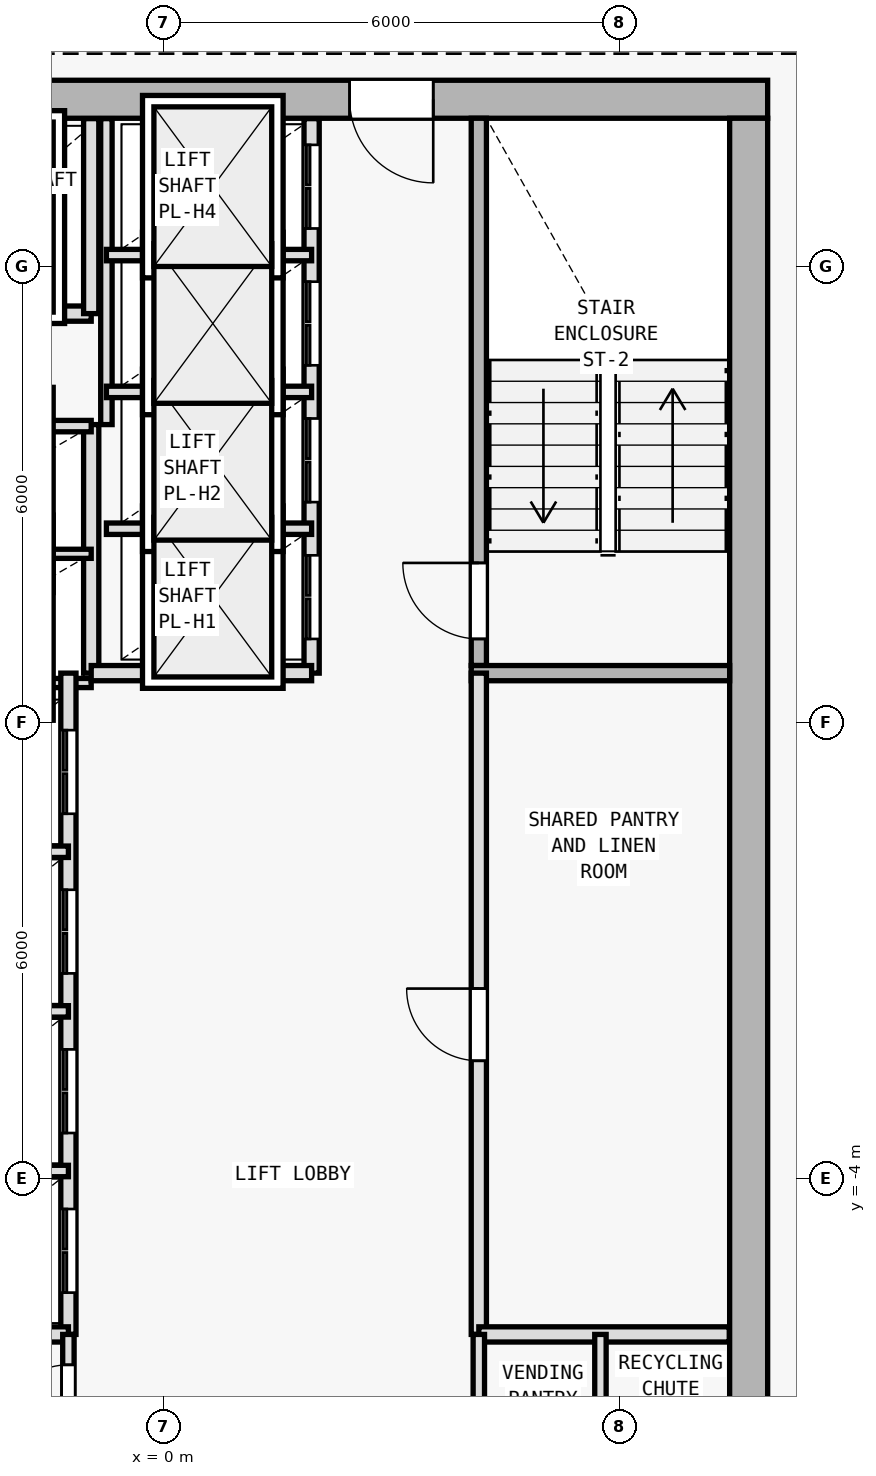
"""IFC4 building model, lengths in metres.
Left out: names, types, materials, properties, quantities, classifications, styles, units other than length and angle.
Written with IfcOpenShell. Run it as: python <this file> out.ifc"""

import sys

from ifc_helpers import new_model, si_unit, direction, frame, frame_2d, origin, origin_2d, place, context, subcontext, project, spatial, rectangle, i_section, extrude, element, fill, save


model = new_model("IFC4")
c1 = context("Model", 3, precision=1e-05, world=origin(), true_north=direction((0.0, 1.0)))
c2 = subcontext(c1, "Body", "Model", "MODEL_VIEW")
j1 = project(units=[si_unit("LENGTHUNIT", "METRE"), si_unit("PLANEANGLEUNIT", "RADIAN")], contexts=[c1])
p1 = place(None, origin())
s1 = spatial("IfcSite", under=j1, at=p1, CompositionType="ELEMENT")
p2 = place(p1, origin())
s2 = spatial("IfcBuilding", under=s1, at=p2, CompositionType="ELEMENT")
p3 = place(p2, frame((0.0, 0.0, 212.7)))
s3 = spatial("IfcBuildingStorey", under=s2, at=p3, CompositionType="ELEMENT", Elevation=212.7)
for number, where, z_axis, x_axis in (
    (1, (7.7, 10.2, 0.0), (0.0, 0.0, 1.0), (1.0, 0.0, 0.0)),
    (2, (7.7, 0.4, 0.0), (0.0, 0.0, 1.0), (1.0, 0.0, 0.0)),
):
    element("IfcColumn", number, at=place(p3, frame(where, z_axis=z_axis, x_axis=x_axis)), inside=s3, PredefinedType="COLUMN", context=c2, shape_type="SweptSolid", body=[
        extrude(i_section(OverallWidth=0.398, OverallDepth=0.387, WebThickness=0.013, FlangeThickness=0.022, FilletRadius=0.015, at=origin_2d()), origin(), (0.0, 0.0, 1.0), 3.6),
    ])
p4 = place(p3, frame((7.95, 10.2, 0.0), z_axis=(0.0, 0.0, 1.0), x_axis=(-1.0, 0.0, 0.0)))
e3 = element("IfcWall", 3, at=p4, inside=s3, PredefinedType="SHEAR", context=c2, shape_type="SweptSolid", body=[
    extrude(rectangle(XDim=15.9, YDim=0.5, at=frame_2d((7.95, 0.0))), origin(), (0.0, 0.0, 1.0), 3.35),
])
p5 = place(p4, frame((4.4, 0.0, 0.0)))
e4 = element("IfcOpeningElement", 4, at=p5, cuts=e3, PredefinedType="OPENING", context=c2, shape_type="SweptSolid", body=[
    extrude(rectangle(XDim=1.1, YDim=2.15, at=frame_2d((0.55, 1.075))), frame((0.0, 0.26, 0.0), z_axis=(0.0, -1.0, 0.0), x_axis=(1.0, 0.0, 0.0)), (0.0, 0.0, 1.0), 0.52),
])
p6 = place(p3, frame((7.7, 9.95, 0.0), z_axis=(0.0, 0.0, 1.0), x_axis=(0.0, -1.0, 0.0)))
e5 = element("IfcWall", 5, at=p6, inside=s3, PredefinedType="SHEAR", context=c2, shape_type="SweptSolid", body=[
    extrude(rectangle(XDim=19.1, YDim=0.5, at=frame_2d((9.55, 0.0))), origin(), (0.0, 0.0, 1.0), 3.35),
])
p7 = place(p3, frame((4.15, 2.75, 0.0), z_axis=(0.0, 0.0, 1.0), x_axis=(0.0, 1.0, 0.0)))
e6 = element("IfcWall", 6, at=p7, inside=s3, PredefinedType="SOLIDWALL", context=c2, shape_type="SweptSolid", body=[
    extrude(rectangle(XDim=7.2, YDim=0.2, at=frame_2d((3.6, 0.0))), origin(), (0.0, 0.0, 1.0), 3.35),
])
p8 = place(p7, frame((0.35, 0.0, 0.0)))
e7 = element("IfcOpeningElement", 7, at=p8, cuts=e6, PredefinedType="OPENING", context=c2, shape_type="SweptSolid", body=[
    extrude(rectangle(XDim=1.0, YDim=2.15, at=frame_2d((0.5, 1.075))), frame((0.0, 0.11, 0.0), z_axis=(0.0, -1.0, 0.0), x_axis=(1.0, 0.0, 0.0)), (0.0, 0.0, 1.0), 0.22),
])
p9 = place(p3, frame((4.05, 2.65, 0.0), z_axis=(0.0, 0.0, 1.0), x_axis=(1.0, 0.0, 0.0)))
e8 = element("IfcWall", 8, at=p9, inside=s3, PredefinedType="SOLIDWALL", context=c2, shape_type="SweptSolid", body=[
    extrude(rectangle(XDim=3.4, YDim=0.2, at=frame_2d((1.7, 0.0))), origin(), (0.0, 0.0, 1.0), 3.35),
])
p10 = place(p3, frame((-0.95, 2.65, 0.0), z_axis=(0.0, 0.0, 1.0), x_axis=(0.0, 1.0, 0.0)))
e9 = element("IfcWall", 9, at=p10, inside=s3, PredefinedType="SOLIDWALL", context=c2, shape_type="SweptSolid", body=[
    extrude(rectangle(XDim=3.27, YDim=0.2, at=frame_2d((1.635, 0.0))), origin(), (0.0, 0.0, 1.0), 3.35),
])
for number, where, z_axis, x_axis in (
    (10, (-3.85, 2.52, 0.0), (0.0, 0.0, 1.0), (1.0, 0.0, 0.0)),
    (11, (-3.85, 4.22, 0.0), (0.0, 0.0, 1.0), (1.0, 0.0, 0.0)),
):
    element("IfcWall", number, at=place(p3, frame(where, z_axis=z_axis, x_axis=x_axis)), inside=s3, PredefinedType="PARTITIONING", context=c2, shape_type="SweptSolid", body=[
        extrude(rectangle(XDim=2.9, YDim=0.12, at=frame_2d((1.45, 0.0))), origin(), (0.0, 0.0, 1.0), 3.35),
    ])
p11 = place(p3, frame((-3.85, 5.9, 0.0), z_axis=(0.0, 0.0, 1.0), x_axis=(1.0, 0.0, 0.0)))
e12 = element("IfcWall", 12, at=p11, inside=s3, PredefinedType="PARTITIONING", context=c2, shape_type="SweptSolid", body=[
    extrude(rectangle(XDim=2.9, YDim=0.15, at=frame_2d((1.45, 0.0))), origin(), (0.0, 0.0, 1.0), 3.35),
])
p12 = place(p3, frame((-3.85, 7.38, 0.0), z_axis=(0.0, 0.0, 1.0), x_axis=(1.0, 0.0, 0.0)))
e13 = element("IfcWall", 13, at=p12, inside=s3, PredefinedType="SOLIDWALL", context=c2, shape_type="SweptSolid", body=[
    extrude(rectangle(XDim=2.9, YDim=0.2, at=frame_2d((1.45, 0.0))), origin(), (0.0, 0.0, 1.0), 3.35),
])
p13 = place(p12, frame((0.85, 0.0, 0.0)))
e14 = element("IfcOpeningElement", 14, at=p13, cuts=e13, PredefinedType="OPENING", context=c2, shape_type="SweptSolid", body=[
    extrude(rectangle(XDim=1.2, YDim=2.2, at=frame_2d((0.6, 1.1))), frame((0.0, 0.11, 0.0), z_axis=(0.0, -1.0, 0.0), x_axis=(1.0, 0.0, 0.0)), (0.0, 0.0, 1.0), 0.22),
])
p14 = place(p3, frame((-0.95, 7.38, 0.0), z_axis=(0.0, 0.0, 1.0), x_axis=(0.0, 1.0, 0.0)))
e15 = element("IfcWall", 15, at=p14, inside=s3, PredefinedType="SOLIDWALL", context=c2, shape_type="SweptSolid", body=[
    extrude(rectangle(XDim=2.565, YDim=0.2, at=frame_2d((1.283, 0.0))), origin(), (0.0, 0.0, 1.0), 3.35),
])
p15 = place(p3, frame((4.15, -6.05, 0.0), z_axis=(0.0, 0.0, 1.0), x_axis=(0.0, 1.0, 0.0)))
e16 = element("IfcWall", 16, at=p15, inside=s3, PredefinedType="SOLIDWALL", context=c2, shape_type="SweptSolid", body=[
    extrude(rectangle(XDim=8.7, YDim=0.2, at=frame_2d((4.35, 0.0))), origin(), (0.0, 0.0, 1.0), 3.35),
])
p16 = place(p15, frame((3.6, 0.0, 0.0)))
e17 = element("IfcOpeningElement", 17, at=p16, cuts=e16, PredefinedType="OPENING", context=c2, shape_type="SweptSolid", body=[
    extrude(rectangle(XDim=0.95, YDim=2.1, at=frame_2d((0.475, 1.05))), frame((0.0, 0.11, 0.0), z_axis=(0.0, -1.0, 0.0), x_axis=(1.0, 0.0, 0.0)), (0.0, 0.0, 1.0), 0.22),
])
p17 = place(p3, frame((-1.25, -6.05, 0.0), z_axis=(0.0, 0.0, 1.0), x_axis=(0.0, 1.0, 0.0)))
e18 = element("IfcWall", 18, at=p17, inside=s3, PredefinedType="SOLIDWALL", context=c2, shape_type="SweptSolid", body=[
    extrude(rectangle(XDim=8.7, YDim=0.2, at=frame_2d((4.35, 0.0))), origin(), (0.0, 0.0, 1.0), 3.35),
])
p18 = place(p17, frame((0.55, 0.0, 0.0)))
e19 = element("IfcOpeningElement", 19, at=p18, cuts=e18, PredefinedType="OPENING", context=c2, shape_type="SweptSolid", body=[
    extrude(rectangle(XDim=1.1, YDim=2.15, at=frame_2d((0.55, 1.075))), frame((0.0, 0.11, 0.0), z_axis=(0.0, -1.0, 0.0), x_axis=(1.0, 0.0, 0.0)), (0.0, 0.0, 1.0), 0.22),
])
p19 = place(p17, frame((2.65, 0.0, 0.0)))
e20 = element("IfcOpeningElement", 20, at=p19, cuts=e18, PredefinedType="OPENING", context=c2, shape_type="SweptSolid", body=[
    extrude(rectangle(XDim=1.1, YDim=2.15, at=frame_2d((0.55, 1.075))), frame((0.0, 0.11, 0.0), z_axis=(0.0, -1.0, 0.0), x_axis=(1.0, 0.0, 0.0)), (0.0, 0.0, 1.0), 0.22),
])
p20 = place(p17, frame((4.75, 0.0, 0.0)))
e21 = element("IfcOpeningElement", 21, at=p20, cuts=e18, PredefinedType="OPENING", context=c2, shape_type="SweptSolid", body=[
    extrude(rectangle(XDim=1.1, YDim=2.15, at=frame_2d((0.55, 1.075))), frame((0.0, 0.11, 0.0), z_axis=(0.0, -1.0, 0.0), x_axis=(1.0, 0.0, 0.0)), (0.0, 0.0, 1.0), 0.22),
])
p21 = place(p17, frame((6.85, 0.0, 0.0)))
e22 = element("IfcOpeningElement", 22, at=p21, cuts=e18, PredefinedType="OPENING", context=c2, shape_type="SweptSolid", body=[
    extrude(rectangle(XDim=1.1, YDim=2.15, at=frame_2d((0.55, 1.075))), frame((0.0, 0.11, 0.0), z_axis=(0.0, -1.0, 0.0), x_axis=(1.0, 0.0, 0.0)), (0.0, 0.0, 1.0), 0.22),
])
for number, where, z_axis, x_axis in (
    (23, (-4.15, -3.9, 0.0), (0.0, 0.0, 1.0), (1.0, 0.0, 0.0)),
    (24, (-4.15, -1.8, 0.0), (0.0, 0.0, 1.0), (1.0, 0.0, 0.0)),
    (25, (-4.15, 0.3, 0.0), (0.0, 0.0, 1.0), (1.0, 0.0, 0.0)),
):
    element("IfcWall", number, at=place(p3, frame(where, z_axis=z_axis, x_axis=x_axis)), inside=s3, PredefinedType="PARTITIONING", context=c2, shape_type="SweptSolid", body=[
        extrude(rectangle(XDim=2.9, YDim=0.15, at=frame_2d((1.45, 0.0))), origin(), (0.0, 0.0, 1.0), 3.35),
    ])
p22 = place(p3, frame((1.95, 2.65, 0.0), z_axis=(0.0, 0.0, 1.0), x_axis=(0.0, 1.0, 0.0)))
e26 = element("IfcWall", 26, at=p22, inside=s3, PredefinedType="SOLIDWALL", context=c2, shape_type="SweptSolid", body=[
    extrude(rectangle(XDim=7.295, YDim=0.2, at=frame_2d((3.647, 0.0))), origin(), (0.0, 0.0, 1.0), 3.35),
])
p23 = place(p22, frame((0.45, 0.0, 0.0)))
e27 = element("IfcOpeningElement", 27, at=p23, cuts=e26, PredefinedType="OPENING", context=c2, shape_type="SweptSolid", body=[
    extrude(rectangle(XDim=1.1, YDim=2.15, at=frame_2d((0.55, 1.075))), frame((0.0, 0.11, 0.0), z_axis=(0.0, -1.0, 0.0), x_axis=(1.0, 0.0, 0.0)), (0.0, 0.0, 1.0), 0.22),
])
p24 = place(p22, frame((2.25, 0.0, 0.0)))
e28 = element("IfcOpeningElement", 28, at=p24, cuts=e26, PredefinedType="OPENING", context=c2, shape_type="SweptSolid", body=[
    extrude(rectangle(XDim=1.1, YDim=2.15, at=frame_2d((0.55, 1.075))), frame((0.0, 0.11, 0.0), z_axis=(0.0, -1.0, 0.0), x_axis=(1.0, 0.0, 0.0)), (0.0, 0.0, 1.0), 0.22),
])
p25 = place(p22, frame((4.05, 0.0, 0.0)))
e29 = element("IfcOpeningElement", 29, at=p25, cuts=e26, PredefinedType="OPENING", context=c2, shape_type="SweptSolid", body=[
    extrude(rectangle(XDim=1.1, YDim=2.15, at=frame_2d((0.55, 1.075))), frame((0.0, 0.11, 0.0), z_axis=(0.0, -1.0, 0.0), x_axis=(1.0, 0.0, 0.0)), (0.0, 0.0, 1.0), 0.22),
])
p26 = place(p22, frame((5.85, 0.0, 0.0)))
e30 = element("IfcOpeningElement", 30, at=p26, cuts=e26, PredefinedType="OPENING", context=c2, shape_type="SweptSolid", body=[
    extrude(rectangle(XDim=1.1, YDim=2.15, at=frame_2d((0.55, 1.075))), frame((0.0, 0.11, 0.0), z_axis=(0.0, -1.0, 0.0), x_axis=(1.0, 0.0, 0.0)), (0.0, 0.0, 1.0), 0.22),
])
p27 = place(p3, frame((-0.95, 2.65, 0.0), z_axis=(0.0, 0.0, 1.0), x_axis=(1.0, 0.0, 0.0)))
e31 = element("IfcWall", 31, at=p27, inside=s3, PredefinedType="SOLIDWALL", context=c2, shape_type="SweptSolid", body=[
    extrude(rectangle(XDim=2.9, YDim=0.2, at=frame_2d((1.45, 0.0))), origin(), (0.0, 0.0, 1.0), 3.35),
])
p28 = place(p3, frame((-0.75, 5.92, 0.0), z_axis=(0.0, 0.0, 1.0), x_axis=(0.0, 1.0, 0.0)))
e32 = element("IfcWall", 32, at=p28, inside=s3, PredefinedType="PARTITIONING", context=c2, shape_type="SweptSolid", body=[
    extrude(rectangle(XDim=4.025, YDim=0.15, at=frame_2d((2.013, 0.0))), origin(), (0.0, 0.0, 1.0), 3.35),
])
for number, where, z_axis, x_axis in (
    (33, (-0.75, 4.55, 0.0), (0.0, 0.0, 1.0), (1.0, 0.0, 0.0)),
    (34, (-0.75, 6.35, 0.0), (0.0, 0.0, 1.0), (1.0, 0.0, 0.0)),
    (35, (-0.75, 8.15, 0.0), (0.0, 0.0, 1.0), (1.0, 0.0, 0.0)),
):
    element("IfcWall", number, at=place(p3, frame(where, z_axis=z_axis, x_axis=x_axis)), inside=s3, PredefinedType="PARTITIONING", context=c2, shape_type="SweptSolid", body=[
        extrude(rectangle(XDim=2.7, YDim=0.15, at=frame_2d((1.35, 0.0))), origin(), (0.0, 0.0, 1.0), 3.35),
    ])
p29 = place(p3, frame((-4.04, -6.05, 0.0), z_axis=(0.0, 0.0, 1.0), x_axis=(1.0, 0.0, 0.0)))
e36 = element("IfcWall", 36, at=p29, inside=s3, PredefinedType="SOLIDWALL", context=c2, shape_type="SweptSolid", body=[
    extrude(rectangle(XDim=2.79, YDim=0.2, at=frame_2d((1.395, 0.0))), origin(), (0.0, 0.0, 1.0), 3.35),
])
p30 = place(p3, frame((4.15, -6.05, 0.0), z_axis=(0.0, 0.0, 1.0), x_axis=(1.0, 0.0, 0.0)))
e37 = element("IfcWall", 37, at=p30, inside=s3, PredefinedType="SOLIDWALL", context=c2, shape_type="SweptSolid", body=[
    extrude(rectangle(XDim=3.295, YDim=0.2, at=frame_2d((1.647, 0.0))), origin(), (0.0, 0.0, 1.0), 3.35),
])
p31 = place(p3, frame((-1.25, -9.145, 0.0), z_axis=(0.0, 0.0, 1.0), x_axis=(0.0, 1.0, 0.0)))
e38 = element("IfcWall", 38, at=p31, inside=s3, PredefinedType="PARTITIONING", context=c2, shape_type="SweptSolid", body=[
    extrude(rectangle(XDim=3.095, YDim=0.15, at=frame_2d((1.547, 0.0))), origin(), (0.0, 0.0, 1.0), 3.35),
])
p32 = place(p31, frame((1.795, 0.0, 0.0)))
e39 = element("IfcOpeningElement", 39, at=p32, cuts=e38, PredefinedType="OPENING", context=c2, shape_type="SweptSolid", body=[
    extrude(rectangle(XDim=0.9, YDim=2.1, at=frame_2d((0.45, 1.05))), frame((0.0, 0.085, 0.0), z_axis=(0.0, -1.0, 0.0), x_axis=(1.0, 0.0, 0.0)), (0.0, 0.0, 1.0), 0.17),
])
p33 = place(p31, frame((0.245, 0.0, 0.0)))
e40 = element("IfcOpeningElement", 40, at=p33, cuts=e38, PredefinedType="OPENING", context=c2, shape_type="SweptSolid", body=[
    extrude(rectangle(XDim=0.9, YDim=2.1, at=frame_2d((0.45, 1.05))), frame((0.0, 0.085, 0.0), z_axis=(0.0, -1.0, 0.0), x_axis=(1.0, 0.0, 0.0)), (0.0, 0.0, 1.0), 0.17),
])
p34 = place(p3, frame((4.15, -9.145, 0.0), z_axis=(0.0, 0.0, 1.0), x_axis=(0.0, 1.0, 0.0)))
e41 = element("IfcWall", 41, at=p34, inside=s3, PredefinedType="PARTITIONING", context=c2, shape_type="SweptSolid", body=[
    extrude(rectangle(XDim=3.095, YDim=0.15, at=frame_2d((1.547, 0.0))), origin(), (0.0, 0.0, 1.0), 3.35),
])
p35 = place(p34, frame((0.845, 0.0, 0.0)))
e42 = element("IfcOpeningElement", 42, at=p35, cuts=e41, PredefinedType="OPENING", context=c2, shape_type="SweptSolid", body=[
    extrude(rectangle(XDim=0.9, YDim=2.1, at=frame_2d((0.45, 1.05))), frame((0.0, 0.085, 0.0), z_axis=(0.0, -1.0, 0.0), x_axis=(1.0, 0.0, 0.0)), (0.0, 0.0, 1.0), 0.17),
])
p36 = place(p3, frame((5.75, -9.145, 0.0), z_axis=(0.0, 0.0, 1.0), x_axis=(0.0, 1.0, 0.0)))
e43 = element("IfcWall", 43, at=p36, inside=s3, PredefinedType="PARTITIONING", context=c2, shape_type="SweptSolid", body=[
    extrude(rectangle(XDim=3.095, YDim=0.15, at=frame_2d((1.547, 0.0))), origin(), (0.0, 0.0, 1.0), 3.35),
])
p37 = place(p36, frame((0.845, 0.0, 0.0)))
e44 = element("IfcOpeningElement", 44, at=p37, cuts=e43, PredefinedType="OPENING", context=c2, shape_type="SweptSolid", body=[
    extrude(rectangle(XDim=0.9, YDim=2.1, at=frame_2d((0.45, 1.05))), frame((0.0, 0.085, 0.0), z_axis=(0.0, -1.0, 0.0), x_axis=(1.0, 0.0, 0.0)), (0.0, 0.0, 1.0), 0.17),
])
p38 = place(p3, frame((7.023, 12.36, 0.0), z_axis=(0.0, 0.0, 1.0), x_axis=(0.84376480085, -0.536713108511, 0.0)))
e45 = element("IfcWall", 45, at=p38, inside=s3, PredefinedType="PARTITIONING", context=c2, shape_type="SweptSolid", body=[
    extrude(rectangle(XDim=7.297, YDim=0.15, at=frame_2d((3.648, 0.0))), origin(), (0.0, 0.0, 1.0), 2.725),
])
p39 = place(p38, frame((3.455, 0.0, 0.0)))
e46 = element("IfcOpeningElement", 46, at=p39, cuts=e45, PredefinedType="OPENING", context=c2, shape_type="SweptSolid", body=[
    extrude(rectangle(XDim=0.9, YDim=2.1, at=frame_2d((0.45, 1.05))), frame((0.0, 0.085, 0.0), z_axis=(0.0, -1.0, 0.0), x_axis=(1.0, 0.0, 0.0)), (0.0, 0.0, 1.0), 0.17),
])
p40 = place(p5, origin())
e47 = element("IfcDoor", 47, at=p40, inside=s3, OperationType="SINGLE_SWING_LEFT", PredefinedType="DOOR", context=c2, shape_type="SweptSolid", body=[
    extrude(rectangle(XDim=1.1, YDim=2.15, at=frame_2d((0.55, 1.075))), frame((0.0, 0.025, 0.0), z_axis=(0.0, -1.0, 0.0), x_axis=(1.0, 0.0, 0.0)), (0.0, 0.0, 1.0), 0.05),
])
fill(e4, e47)
p41 = place(p8, origin())
e48 = element("IfcDoor", 48, at=p41, inside=s3, OperationType="SINGLE_SWING_RIGHT", PredefinedType="DOOR", context=c2, shape_type="SweptSolid", body=[
    extrude(rectangle(XDim=1.0, YDim=2.15, at=frame_2d((0.5, 1.075))), frame((0.0, 0.025, 0.0), z_axis=(0.0, -1.0, 0.0), x_axis=(1.0, 0.0, 0.0)), (0.0, 0.0, 1.0), 0.05),
])
fill(e7, e48)
p42 = place(p16, origin())
e49 = element("IfcDoor", 49, at=p42, inside=s3, OperationType="SINGLE_SWING_RIGHT", PredefinedType="DOOR", context=c2, shape_type="SweptSolid", body=[
    extrude(rectangle(XDim=0.95, YDim=2.1, at=frame_2d((0.475, 1.05))), frame((0.0, 0.025, 0.0), z_axis=(0.0, -1.0, 0.0), x_axis=(1.0, 0.0, 0.0)), (0.0, 0.0, 1.0), 0.05),
])
fill(e17, e49)
p43 = place(p18, origin())
e50 = element("IfcDoor", 50, at=p43, inside=s3, OperationType="DOUBLE_DOOR_SLIDING", PredefinedType="DOOR", context=c2, shape_type="SweptSolid", body=[
    extrude(rectangle(XDim=1.1, YDim=2.15, at=frame_2d((0.55, 1.075))), frame((0.0, 0.025, 0.0), z_axis=(0.0, -1.0, 0.0), x_axis=(1.0, 0.0, 0.0)), (0.0, 0.0, 1.0), 0.05),
])
fill(e19, e50)
p44 = place(p19, origin())
e51 = element("IfcDoor", 51, at=p44, inside=s3, OperationType="DOUBLE_DOOR_SLIDING", PredefinedType="DOOR", context=c2, shape_type="SweptSolid", body=[
    extrude(rectangle(XDim=1.1, YDim=2.15, at=frame_2d((0.55, 1.075))), frame((0.0, 0.025, 0.0), z_axis=(0.0, -1.0, 0.0), x_axis=(1.0, 0.0, 0.0)), (0.0, 0.0, 1.0), 0.05),
])
fill(e20, e51)
p45 = place(p20, origin())
e52 = element("IfcDoor", 52, at=p45, inside=s3, OperationType="DOUBLE_DOOR_SLIDING", PredefinedType="DOOR", context=c2, shape_type="SweptSolid", body=[
    extrude(rectangle(XDim=1.1, YDim=2.15, at=frame_2d((0.55, 1.075))), frame((0.0, 0.025, 0.0), z_axis=(0.0, -1.0, 0.0), x_axis=(1.0, 0.0, 0.0)), (0.0, 0.0, 1.0), 0.05),
])
fill(e21, e52)
p46 = place(p21, origin())
e53 = element("IfcDoor", 53, at=p46, inside=s3, OperationType="DOUBLE_DOOR_SLIDING", PredefinedType="DOOR", context=c2, shape_type="SweptSolid", body=[
    extrude(rectangle(XDim=1.1, YDim=2.15, at=frame_2d((0.55, 1.075))), frame((0.0, 0.025, 0.0), z_axis=(0.0, -1.0, 0.0), x_axis=(1.0, 0.0, 0.0)), (0.0, 0.0, 1.0), 0.05),
])
fill(e22, e53)
p47 = place(p23, origin())
e54 = element("IfcDoor", 54, at=p47, inside=s3, OperationType="DOUBLE_DOOR_SLIDING", PredefinedType="DOOR", context=c2, shape_type="SweptSolid", body=[
    extrude(rectangle(XDim=1.1, YDim=2.15, at=frame_2d((0.55, 1.075))), frame((0.0, 0.025, 0.0), z_axis=(0.0, -1.0, 0.0), x_axis=(1.0, 0.0, 0.0)), (0.0, 0.0, 1.0), 0.05),
])
fill(e27, e54)
p48 = place(p24, origin())
e55 = element("IfcDoor", 55, at=p48, inside=s3, OperationType="DOUBLE_DOOR_SLIDING", PredefinedType="DOOR", context=c2, shape_type="SweptSolid", body=[
    extrude(rectangle(XDim=1.1, YDim=2.15, at=frame_2d((0.55, 1.075))), frame((0.0, 0.025, 0.0), z_axis=(0.0, -1.0, 0.0), x_axis=(1.0, 0.0, 0.0)), (0.0, 0.0, 1.0), 0.05),
])
fill(e28, e55)
p49 = place(p25, origin())
e56 = element("IfcDoor", 56, at=p49, inside=s3, OperationType="DOUBLE_DOOR_SLIDING", PredefinedType="DOOR", context=c2, shape_type="SweptSolid", body=[
    extrude(rectangle(XDim=1.1, YDim=2.15, at=frame_2d((0.55, 1.075))), frame((0.0, 0.025, 0.0), z_axis=(0.0, -1.0, 0.0), x_axis=(1.0, 0.0, 0.0)), (0.0, 0.0, 1.0), 0.05),
])
fill(e29, e56)
p50 = place(p26, origin())
e57 = element("IfcDoor", 57, at=p50, inside=s3, OperationType="DOUBLE_DOOR_SLIDING", PredefinedType="DOOR", context=c2, shape_type="SweptSolid", body=[
    extrude(rectangle(XDim=1.1, YDim=2.15, at=frame_2d((0.55, 1.075))), frame((0.0, 0.025, 0.0), z_axis=(0.0, -1.0, 0.0), x_axis=(1.0, 0.0, 0.0)), (0.0, 0.0, 1.0), 0.05),
])
fill(e30, e57)
p51 = place(p32, origin())
e58 = element("IfcDoor", 58, at=p51, inside=s3, OperationType="SINGLE_SWING_LEFT", PredefinedType="DOOR", context=c2, shape_type="SweptSolid", body=[
    extrude(rectangle(XDim=0.9, YDim=2.1, at=frame_2d((0.45, 1.05))), frame((0.0, 0.025, 0.0), z_axis=(0.0, -1.0, 0.0), x_axis=(1.0, 0.0, 0.0)), (0.0, 0.0, 1.0), 0.05),
])
fill(e39, e58)
save(model, sys.argv[1])
